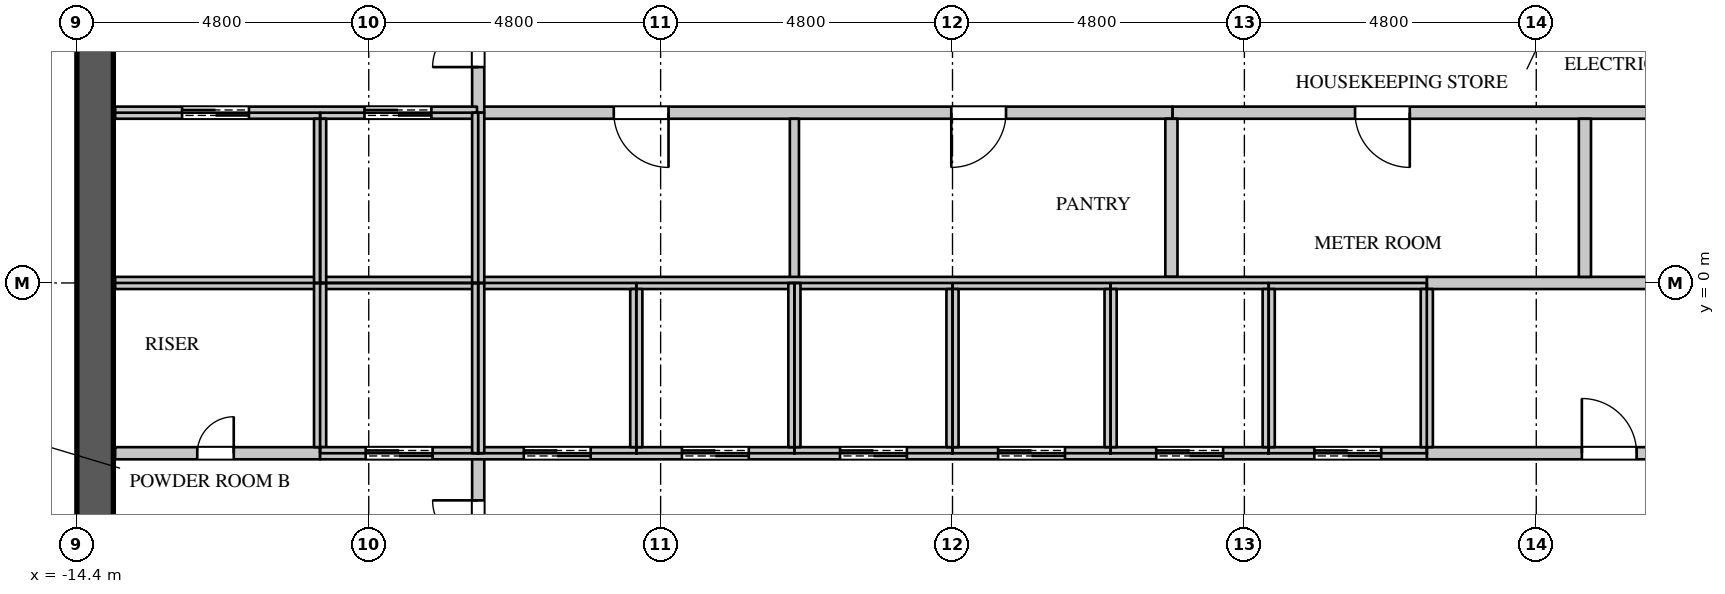
"""IFC4 building model, lengths in metres.
Left out: names, types, materials, properties, quantities, classifications, styles, units other than length and angle.
Written with IfcOpenShell. Run it as: python <this file> out.ifc"""

import sys

from ifc_helpers import new_model, si_unit, direction, frame, frame_2d, origin, place, context, subcontext, project, spatial, rectangle, extrude, element, fill, save


model = new_model("IFC4")
c1 = context("Model", 3, precision=1e-05, world=origin(), true_north=direction((0.0, 1.0)))
c2 = subcontext(c1, "Body", "Model", "MODEL_VIEW")
j1 = project(units=[si_unit("LENGTHUNIT", "METRE"), si_unit("PLANEANGLEUNIT", "RADIAN")], contexts=[c1])
p1 = place(None, origin())
s1 = spatial("IfcSite", under=j1, at=p1, CompositionType="ELEMENT")
p2 = place(p1, origin())
s2 = spatial("IfcBuilding", under=s1, at=p2, CompositionType="ELEMENT")
p3 = place(p2, frame((0.0, 0.0, 247.5)))
s3 = spatial("IfcBuildingStorey", under=s2, at=p3, CompositionType="ELEMENT", Elevation=247.5)
p4 = place(p3, frame((-14.1, -11.4, 0.0), z_axis=(0.0, 0.0, 1.0), x_axis=(0.0, 1.0, 0.0)))
e1 = element("IfcWall", 1, at=p4, inside=s3, PredefinedType="SHEAR", context=c2, shape_type="SweptSolid", body=[
    extrude(rectangle(XDim=22.8, YDim=0.6, at=frame_2d((11.4, 0.0))), origin(), (0.0, 0.0, 1.0), 4.2),
])
p5 = place(p4, frame((20.45, 0.0, 0.0)))
e2 = element("IfcOpeningElement", 2, at=p5, cuts=e1, PredefinedType="OPENING", context=c2, shape_type="SweptSolid", body=[
    extrude(rectangle(XDim=1.1, YDim=2.2, at=frame_2d((0.55, 1.1))), frame((0.0, 0.31, 0.0), z_axis=(0.0, -1.0, 0.0), x_axis=(1.0, 0.0, 0.0)), (0.0, 0.0, 1.0), 0.62),
])
p6 = place(p4, frame((1.25, 0.0, 0.0)))
e3 = element("IfcOpeningElement", 3, at=p6, cuts=e1, PredefinedType="OPENING", context=c2, shape_type="SweptSolid", body=[
    extrude(rectangle(XDim=1.1, YDim=2.2, at=frame_2d((0.55, 1.1))), frame((0.0, 0.31, 0.0), z_axis=(0.0, -1.0, 0.0), x_axis=(1.0, 0.0, 0.0)), (0.0, 0.0, 1.0), 0.62),
])
p7 = place(p4, frame((16.15, 0.0, 0.0)))
e4 = element("IfcOpeningElement", 4, at=p7, cuts=e1, PredefinedType="OPENING", context=c2, shape_type="SweptSolid", body=[
    extrude(rectangle(XDim=1.5, YDim=2.4, at=frame_2d((0.75, 1.2))), frame((0.0, 0.31, 0.0), z_axis=(0.0, -1.0, 0.0), x_axis=(1.0, 0.0, 0.0)), (0.0, 0.0, 1.0), 0.62),
])
p8 = place(p4, frame((5.15, 0.0, 0.0)))
e5 = element("IfcOpeningElement", 5, at=p8, cuts=e1, PredefinedType="OPENING", context=c2, shape_type="SweptSolid", body=[
    extrude(rectangle(XDim=1.5, YDim=2.4, at=frame_2d((0.75, 1.2))), frame((0.0, 0.31, 0.0), z_axis=(0.0, -1.0, 0.0), x_axis=(1.0, 0.0, 0.0)), (0.0, 0.0, 1.0), 0.62),
])
p9 = place(p3, frame((-7.82, 2.8, 0.0), z_axis=(0.0, 0.0, 1.0), x_axis=(1.0, 0.0, 0.0)))
e6 = element("IfcWall", 6, at=p9, inside=s3, PredefinedType="PARTITIONING", context=c2, shape_type="SweptSolid", body=[
    extrude(rectangle(XDim=11.44, YDim=0.2, at=frame_2d((5.72, 0.0))), origin(), (0.0, 0.0, 1.0), 3.95),
])
p10 = place(p9, frame((2.25, 0.0, 0.0)))
e7 = element("IfcOpeningElement", 7, at=p10, cuts=e6, PredefinedType="OPENING", context=c2, shape_type="SweptSolid", body=[
    extrude(rectangle(XDim=0.9, YDim=2.2, at=frame_2d((0.45, 1.1))), frame((0.0, 0.11, 0.0), z_axis=(0.0, -1.0, 0.0), x_axis=(1.0, 0.0, 0.0)), (0.0, 0.0, 1.0), 0.22),
])
p11 = place(p9, frame((7.8, 0.0, 0.0)))
e8 = element("IfcOpeningElement", 8, at=p11, cuts=e6, PredefinedType="OPENING", context=c2, shape_type="SweptSolid", body=[
    extrude(rectangle(XDim=0.9, YDim=2.2, at=frame_2d((0.45, 1.1))), frame((0.0, 0.11, 0.0), z_axis=(0.0, -1.0, 0.0), x_axis=(1.0, 0.0, 0.0)), (0.0, 0.0, 1.0), 0.22),
])
p12 = place(p3, frame((-7.8, -8.075, 0.0), z_axis=(0.0, 0.0, 1.0), x_axis=(0.0, 1.0, 0.0)))
e9 = element("IfcWall", 9, at=p12, inside=s3, PredefinedType="PARTITIONING", context=c2, shape_type="SweptSolid", body=[
    extrude(rectangle(XDim=5.275, YDim=0.2, at=frame_2d((2.637, 0.0))), origin(), (0.0, 0.0, 1.0), 3.95),
])
p13 = place(p12, frame((3.0, 0.0, 0.0)))
e10 = element("IfcOpeningElement", 10, at=p13, cuts=e9, PredefinedType="OPENING", context=c2, shape_type="SweptSolid", body=[
    extrude(rectangle(XDim=1.5, YDim=2.4, at=frame_2d((0.75, 1.2))), frame((0.0, 0.11, 0.0), z_axis=(0.0, -1.0, 0.0), x_axis=(1.0, 0.0, 0.0)), (0.0, 0.0, 1.0), 0.22),
])
p14 = place(p3, frame((-7.8, 2.8, 0.0), z_axis=(0.0, 0.0, 1.0), x_axis=(0.0, 1.0, 0.0)))
e11 = element("IfcWall", 11, at=p14, inside=s3, PredefinedType="PARTITIONING", context=c2, shape_type="SweptSolid", body=[
    extrude(rectangle(XDim=5.275, YDim=0.2, at=frame_2d((2.637, 0.0))), origin(), (0.0, 0.0, 1.0), 3.95),
])
p15 = place(p14, frame((0.75, 0.0, 0.0)))
e12 = element("IfcOpeningElement", 12, at=p15, cuts=e11, PredefinedType="OPENING", context=c2, shape_type="SweptSolid", body=[
    extrude(rectangle(XDim=1.5, YDim=2.4, at=frame_2d((0.75, 1.2))), frame((0.0, 0.11, 0.0), z_axis=(0.0, -1.0, 0.0), x_axis=(1.0, 0.0, 0.0)), (0.0, 0.0, 1.0), 0.22),
])
p16 = place(p3, frame((-2.6, 0.0, 0.0), z_axis=(0.0, 0.0, 1.0), x_axis=(0.0, 1.0, 0.0)))
e13 = element("IfcWall", 13, at=p16, inside=s3, PredefinedType="PARTITIONING", context=c2, shape_type="SweptSolid", body=[
    extrude(rectangle(XDim=2.7, YDim=0.15, at=frame_2d((1.35, 0.0))), origin(), (0.0, 0.0, 1.0), 3.95),
])
p17 = place(p3, frame((-13.77, -2.8, 0.0), z_axis=(0.0, 0.0, 1.0), x_axis=(1.0, 0.0, 0.0)))
e14 = element("IfcWall", 14, at=p17, inside=s3, PredefinedType="PARTITIONING", context=c2, shape_type="SweptSolid", body=[
    extrude(rectangle(XDim=3.37, YDim=0.2, at=frame_2d((1.685, 0.0))), origin(), (0.0, 0.0, 1.0), 3.95),
])
p18 = place(p17, frame((1.35, 0.0, 0.0)))
e15 = element("IfcOpeningElement", 15, at=p18, cuts=e14, PredefinedType="OPENING", context=c2, shape_type="SweptSolid", body=[
    extrude(rectangle(XDim=0.6, YDim=2.0, at=frame_2d((0.3, 1.0))), frame((0.0, 0.11, 0.0), z_axis=(0.0, -1.0, 0.0), x_axis=(1.0, 0.0, 0.0)), (0.0, 0.0, 1.0), 0.22),
])
p19 = place(p3, frame((3.62, 2.8, 0.0), z_axis=(0.0, 0.0, 1.0), x_axis=(1.0, 0.0, 0.0)))
e16 = element("IfcWall", 16, at=p19, inside=s3, PredefinedType="PARTITIONING", context=c2, shape_type="SweptSolid", body=[
    extrude(rectangle(XDim=10.15, YDim=0.2, at=frame_2d((5.075, 0.0))), origin(), (0.0, 0.0, 1.0), 3.95),
])
p20 = place(p19, frame((8.1, 0.0, 0.0)))
e17 = element("IfcOpeningElement", 17, at=p20, cuts=e16, PredefinedType="OPENING", context=c2, shape_type="SweptSolid", body=[
    extrude(rectangle(XDim=0.6, YDim=2.0, at=frame_2d((0.3, 1.0))), frame((0.0, 0.11, 0.0), z_axis=(0.0, -1.0, 0.0), x_axis=(1.0, 0.0, 0.0)), (0.0, 0.0, 1.0), 0.22),
])
p21 = place(p19, frame((3.0, 0.0, 0.0)))
e18 = element("IfcOpeningElement", 18, at=p21, cuts=e16, PredefinedType="OPENING", context=c2, shape_type="SweptSolid", body=[
    extrude(rectangle(XDim=0.9, YDim=2.2, at=frame_2d((0.45, 1.1))), frame((0.0, 0.11, 0.0), z_axis=(0.0, -1.0, 0.0), x_axis=(1.0, 0.0, 0.0)), (0.0, 0.0, 1.0), 0.22),
])
p22 = place(p3, frame((3.6, 0.1, 0.0), z_axis=(0.0, 0.0, 1.0), x_axis=(0.0, 1.0, 0.0)))
e19 = element("IfcWall", 19, at=p22, inside=s3, PredefinedType="PARTITIONING", context=c2, shape_type="SweptSolid", body=[
    extrude(rectangle(XDim=2.6, YDim=0.2, at=frame_2d((1.3, 0.0))), origin(), (0.0, 0.0, 1.0), 3.95),
])
p23 = place(p3, frame((7.8, -2.8, 0.0), z_axis=(0.0, 0.0, 1.0), x_axis=(1.0, 0.0, 0.0)))
e20 = element("IfcWall", 20, at=p23, inside=s3, PredefinedType="PARTITIONING", context=c2, shape_type="SweptSolid", body=[
    extrude(rectangle(XDim=5.97, YDim=0.2, at=frame_2d((2.985, 0.0))), origin(), (0.0, 0.0, 1.0), 3.95),
])
p24 = place(p23, frame((2.55, 0.0, 0.0)))
e21 = element("IfcOpeningElement", 21, at=p24, cuts=e20, PredefinedType="OPENING", context=c2, shape_type="SweptSolid", body=[
    extrude(rectangle(XDim=0.9, YDim=2.2, at=frame_2d((0.45, 1.1))), frame((0.0, 0.11, 0.0), z_axis=(0.0, -1.0, 0.0), x_axis=(1.0, 0.0, 0.0)), (0.0, 0.0, 1.0), 0.22),
])
p25 = place(p3, frame((7.8, 0.0, 0.0), z_axis=(0.0, 0.0, 1.0), x_axis=(1.0, 0.0, 0.0)))
e22 = element("IfcWall", 22, at=p25, inside=s3, PredefinedType="PARTITIONING", context=c2, shape_type="SweptSolid", body=[
    extrude(rectangle(XDim=5.97, YDim=0.2, at=frame_2d((2.985, 0.0))), origin(), (0.0, 0.0, 1.0), 3.95),
])
p26 = place(p3, frame((10.4, 0.1, 0.0), z_axis=(0.0, 0.0, 1.0), x_axis=(0.0, 1.0, 0.0)))
e23 = element("IfcWall", 23, at=p26, inside=s3, PredefinedType="PARTITIONING", context=c2, shape_type="SweptSolid", body=[
    extrude(rectangle(XDim=2.6, YDim=0.2, at=frame_2d((1.3, 0.0))), origin(), (0.0, 0.0, 1.0), 3.95),
])
p27 = place(p3, frame((-13.77, 0.0, 0.0), z_axis=(0.0, 0.0, 1.0), x_axis=(1.0, 0.0, 0.0)))
e24 = element("IfcWall", 24, at=p27, inside=s3, PredefinedType="PARTITIONING", context=c2, shape_type="SweptSolid", body=[
    extrude(rectangle(XDim=21.57, YDim=0.2, at=frame_2d((10.785, 0.0))), origin(), (0.0, 0.0, 1.0), 3.95),
])
p28 = place(p3, frame((-13.77, 2.8, 0.0), z_axis=(0.0, 0.0, 1.0), x_axis=(1.0, 0.0, 0.0)))
e25 = element("IfcWall", 25, at=p28, inside=s3, PredefinedType="PARTITIONING", context=c2, shape_type="SweptSolid", body=[
    extrude(rectangle(XDim=5.95, YDim=0.2, at=frame_2d((2.975, 0.0))), origin(), (0.0, 0.0, 1.0), 3.95),
])
p29 = place(p28, frame((1.1, 0.0, 0.0)))
e26 = element("IfcOpeningElement", 26, at=p29, cuts=e25, PredefinedType="OPENING", context=c2, shape_type="SweptSolid", body=[
    extrude(rectangle(XDim=1.1, YDim=2.2, at=frame_2d((0.55, 1.1))), frame((0.0, 0.11, 0.0), z_axis=(0.0, -1.0, 0.0), x_axis=(1.0, 0.0, 0.0)), (0.0, 0.0, 1.0), 0.22),
])
p30 = place(p28, frame((4.1, 0.0, 0.0)))
e27 = element("IfcOpeningElement", 27, at=p30, cuts=e25, PredefinedType="OPENING", context=c2, shape_type="SweptSolid", body=[
    extrude(rectangle(XDim=1.1, YDim=2.2, at=frame_2d((0.55, 1.1))), frame((0.0, 0.11, 0.0), z_axis=(0.0, -1.0, 0.0), x_axis=(1.0, 0.0, 0.0)), (0.0, 0.0, 1.0), 0.22),
])
p31 = place(p3, frame((-10.4, -2.7, 0.0), z_axis=(0.0, 0.0, 1.0), x_axis=(0.0, 1.0, 0.0)))
e28 = element("IfcWall", 28, at=p31, inside=s3, PredefinedType="PARTITIONING", context=c2, shape_type="SweptSolid", body=[
    extrude(rectangle(XDim=2.7, YDim=0.2, at=frame_2d((1.35, 0.0))), origin(), (0.0, 0.0, 1.0), 3.95),
])
p32 = place(p3, frame((-10.4, -2.8, 0.0), z_axis=(0.0, 0.0, 1.0), x_axis=(1.0, 0.0, 0.0)))
e29 = element("IfcWall", 29, at=p32, inside=s3, PredefinedType="PARTITIONING", context=c2, shape_type="SweptSolid", body=[
    extrude(rectangle(XDim=18.2, YDim=0.2, at=frame_2d((9.1, 0.0))), origin(), (0.0, 0.0, 1.0), 3.95),
])
p33 = place(p32, frame((0.75, 0.0, 0.0)))
e30 = element("IfcOpeningElement", 30, at=p33, cuts=e29, PredefinedType="OPENING", context=c2, shape_type="SweptSolid", body=[
    extrude(rectangle(XDim=1.1, YDim=2.2, at=frame_2d((0.55, 1.1))), frame((0.0, 0.11, 0.0), z_axis=(0.0, -1.0, 0.0), x_axis=(1.0, 0.0, 0.0)), (0.0, 0.0, 1.0), 0.22),
])
p34 = place(p32, frame((3.35, 0.0, 0.0)))
e31 = element("IfcOpeningElement", 31, at=p34, cuts=e29, PredefinedType="OPENING", context=c2, shape_type="SweptSolid", body=[
    extrude(rectangle(XDim=1.1, YDim=2.2, at=frame_2d((0.55, 1.1))), frame((0.0, 0.11, 0.0), z_axis=(0.0, -1.0, 0.0), x_axis=(1.0, 0.0, 0.0)), (0.0, 0.0, 1.0), 0.22),
])
p35 = place(p32, frame((5.95, 0.0, 0.0)))
e32 = element("IfcOpeningElement", 32, at=p35, cuts=e29, PredefinedType="OPENING", context=c2, shape_type="SweptSolid", body=[
    extrude(rectangle(XDim=1.1, YDim=2.2, at=frame_2d((0.55, 1.1))), frame((0.0, 0.11, 0.0), z_axis=(0.0, -1.0, 0.0), x_axis=(1.0, 0.0, 0.0)), (0.0, 0.0, 1.0), 0.22),
])
p36 = place(p32, frame((8.55, 0.0, 0.0)))
e33 = element("IfcOpeningElement", 33, at=p36, cuts=e29, PredefinedType="OPENING", context=c2, shape_type="SweptSolid", body=[
    extrude(rectangle(XDim=1.1, YDim=2.2, at=frame_2d((0.55, 1.1))), frame((0.0, 0.11, 0.0), z_axis=(0.0, -1.0, 0.0), x_axis=(1.0, 0.0, 0.0)), (0.0, 0.0, 1.0), 0.22),
])
p37 = place(p32, frame((11.15, 0.0, 0.0)))
e34 = element("IfcOpeningElement", 34, at=p37, cuts=e29, PredefinedType="OPENING", context=c2, shape_type="SweptSolid", body=[
    extrude(rectangle(XDim=1.1, YDim=2.2, at=frame_2d((0.55, 1.1))), frame((0.0, 0.11, 0.0), z_axis=(0.0, -1.0, 0.0), x_axis=(1.0, 0.0, 0.0)), (0.0, 0.0, 1.0), 0.22),
])
p38 = place(p32, frame((13.75, 0.0, 0.0)))
e35 = element("IfcOpeningElement", 35, at=p38, cuts=e29, PredefinedType="OPENING", context=c2, shape_type="SweptSolid", body=[
    extrude(rectangle(XDim=1.1, YDim=2.2, at=frame_2d((0.55, 1.1))), frame((0.0, 0.11, 0.0), z_axis=(0.0, -1.0, 0.0), x_axis=(1.0, 0.0, 0.0)), (0.0, 0.0, 1.0), 0.22),
])
p39 = place(p32, frame((16.35, 0.0, 0.0)))
e36 = element("IfcOpeningElement", 36, at=p39, cuts=e29, PredefinedType="OPENING", context=c2, shape_type="SweptSolid", body=[
    extrude(rectangle(XDim=1.1, YDim=2.2, at=frame_2d((0.55, 1.1))), frame((0.0, 0.11, 0.0), z_axis=(0.0, -1.0, 0.0), x_axis=(1.0, 0.0, 0.0)), (0.0, 0.0, 1.0), 0.22),
])
p40 = place(p3, frame((-10.4, 0.0, 0.0), z_axis=(0.0, 0.0, 1.0), x_axis=(0.0, 1.0, 0.0)))
e37 = element("IfcWall", 37, at=p40, inside=s3, PredefinedType="PARTITIONING", context=c2, shape_type="SweptSolid", body=[
    extrude(rectangle(XDim=2.7, YDim=0.2, at=frame_2d((1.35, 0.0))), origin(), (0.0, 0.0, 1.0), 3.95),
])
for number, where, z_axis, x_axis in (
    (38, (-7.8, -2.8, 0.0), (0.0, 0.0, 1.0), (0.0, 1.0, 0.0)),
    (39, (-7.8, 0.0, 0.0), (0.0, 0.0, 1.0), (0.0, 1.0, 0.0)),
):
    element("IfcWall", number, at=place(p3, frame(where, z_axis=z_axis, x_axis=x_axis)), inside=s3, PredefinedType="PARTITIONING", context=c2, shape_type="SweptSolid", body=[
        extrude(rectangle(XDim=2.8, YDim=0.2, at=frame_2d((1.4, 0.0))), origin(), (0.0, 0.0, 1.0), 3.95),
    ])
p41 = place(p3, frame((-5.2, -2.7, 0.0), z_axis=(0.0, 0.0, 1.0), x_axis=(0.0, 1.0, 0.0)))
e40 = element("IfcWall", 40, at=p41, inside=s3, PredefinedType="PARTITIONING", context=c2, shape_type="SweptSolid", body=[
    extrude(rectangle(XDim=2.6, YDim=0.2, at=frame_2d((1.3, 0.0))), origin(), (0.0, 0.0, 1.0), 3.95),
])
p42 = place(p3, frame((-2.6, -2.7, 0.0), z_axis=(0.0, 0.0, 1.0), x_axis=(0.0, 1.0, 0.0)))
e41 = element("IfcWall", 41, at=p42, inside=s3, PredefinedType="PARTITIONING", context=c2, shape_type="SweptSolid", body=[
    extrude(rectangle(XDim=2.7, YDim=0.2, at=frame_2d((1.35, 0.0))), origin(), (0.0, 0.0, 1.0), 3.95),
])
for number, where, z_axis, x_axis in (
    (42, (0.0, -2.7, 0.0), (0.0, 0.0, 1.0), (0.0, 1.0, 0.0)),
    (43, (2.6, -2.7, 0.0), (0.0, 0.0, 1.0), (0.0, 1.0, 0.0)),
    (44, (5.2, -2.7, 0.0), (0.0, 0.0, 1.0), (0.0, 1.0, 0.0)),
    (45, (7.8, -2.7, 0.0), (0.0, 0.0, 1.0), (0.0, 1.0, 0.0)),
):
    element("IfcWall", number, at=place(p3, frame(where, z_axis=z_axis, x_axis=x_axis)), inside=s3, PredefinedType="PARTITIONING", context=c2, shape_type="SweptSolid", body=[
        extrude(rectangle(XDim=2.6, YDim=0.2, at=frame_2d((1.3, 0.0))), origin(), (0.0, 0.0, 1.0), 3.95),
    ])
p43 = place(p18, origin())
e46 = element("IfcDoor", 46, at=p43, inside=s3, OperationType="SINGLE_SWING_RIGHT", PredefinedType="DOOR", context=c2, shape_type="SweptSolid", body=[
    extrude(rectangle(XDim=0.6, YDim=2.0, at=frame_2d((0.3, 1.0))), frame((0.0, 0.025, 0.0), z_axis=(0.0, -1.0, 0.0), x_axis=(1.0, 0.0, 0.0)), (0.0, 0.0, 1.0), 0.05),
])
fill(e15, e46)
p44 = place(p24, origin())
e47 = element("IfcDoor", 47, at=p44, inside=s3, OperationType="SINGLE_SWING_LEFT", PredefinedType="DOOR", context=c2, shape_type="SweptSolid", body=[
    extrude(rectangle(XDim=0.9, YDim=2.2, at=frame_2d((0.45, 1.1))), frame((0.0, 0.025, 0.0), z_axis=(0.0, -1.0, 0.0), x_axis=(1.0, 0.0, 0.0)), (0.0, 0.0, 1.0), 0.05),
])
fill(e21, e47)
p45 = place(p10, origin())
e48 = element("IfcDoor", 48, at=p45, inside=s3, OperationType="SINGLE_SWING_LEFT", PredefinedType="DOOR", context=c2, shape_type="SweptSolid", body=[
    extrude(rectangle(XDim=0.9, YDim=2.2, at=frame_2d((0.45, 1.1))), frame((0.0, 0.025, 0.0), z_axis=(0.0, -1.0, 0.0), x_axis=(1.0, 0.0, 0.0)), (0.0, 0.0, 1.0), 0.05),
])
fill(e7, e48)
p46 = place(p11, origin())
e49 = element("IfcDoor", 49, at=p46, inside=s3, OperationType="SINGLE_SWING_RIGHT", PredefinedType="DOOR", context=c2, shape_type="SweptSolid", body=[
    extrude(rectangle(XDim=0.9, YDim=2.2, at=frame_2d((0.45, 1.1))), frame((0.0, 0.025, 0.0), z_axis=(0.0, -1.0, 0.0), x_axis=(1.0, 0.0, 0.0)), (0.0, 0.0, 1.0), 0.05),
])
fill(e8, e49)
p47 = place(p21, origin())
e50 = element("IfcDoor", 50, at=p47, inside=s3, OperationType="SINGLE_SWING_LEFT", PredefinedType="DOOR", context=c2, shape_type="SweptSolid", body=[
    extrude(rectangle(XDim=0.9, YDim=2.2, at=frame_2d((0.45, 1.1))), frame((0.0, 0.025, 0.0), z_axis=(0.0, -1.0, 0.0), x_axis=(1.0, 0.0, 0.0)), (0.0, 0.0, 1.0), 0.05),
])
fill(e18, e50)
p48 = place(p29, origin())
e51 = element("IfcDoor", 51, at=p48, inside=s3, OperationType="DOUBLE_DOOR_SLIDING", PredefinedType="DOOR", context=c2, shape_type="SweptSolid", body=[
    extrude(rectangle(XDim=1.1, YDim=2.2, at=frame_2d((0.55, 1.1))), frame((0.0, 0.025, 0.0), z_axis=(0.0, -1.0, 0.0), x_axis=(1.0, 0.0, 0.0)), (0.0, 0.0, 1.0), 0.05),
])
fill(e26, e51)
p49 = place(p30, origin())
e52 = element("IfcDoor", 52, at=p49, inside=s3, OperationType="DOUBLE_DOOR_SLIDING", PredefinedType="DOOR", context=c2, shape_type="SweptSolid", body=[
    extrude(rectangle(XDim=1.1, YDim=2.2, at=frame_2d((0.55, 1.1))), frame((0.0, 0.025, 0.0), z_axis=(0.0, -1.0, 0.0), x_axis=(1.0, 0.0, 0.0)), (0.0, 0.0, 1.0), 0.05),
])
fill(e27, e52)
p50 = place(p33, origin())
e53 = element("IfcDoor", 53, at=p50, inside=s3, OperationType="DOUBLE_DOOR_SLIDING", PredefinedType="DOOR", context=c2, shape_type="SweptSolid", body=[
    extrude(rectangle(XDim=1.1, YDim=2.2, at=frame_2d((0.55, 1.1))), frame((0.0, 0.025, 0.0), z_axis=(0.0, -1.0, 0.0), x_axis=(1.0, 0.0, 0.0)), (0.0, 0.0, 1.0), 0.05),
])
fill(e30, e53)
p51 = place(p34, origin())
e54 = element("IfcDoor", 54, at=p51, inside=s3, OperationType="DOUBLE_DOOR_SLIDING", PredefinedType="DOOR", context=c2, shape_type="SweptSolid", body=[
    extrude(rectangle(XDim=1.1, YDim=2.2, at=frame_2d((0.55, 1.1))), frame((0.0, 0.025, 0.0), z_axis=(0.0, -1.0, 0.0), x_axis=(1.0, 0.0, 0.0)), (0.0, 0.0, 1.0), 0.05),
])
fill(e31, e54)
p52 = place(p35, origin())
e55 = element("IfcDoor", 55, at=p52, inside=s3, OperationType="DOUBLE_DOOR_SLIDING", PredefinedType="DOOR", context=c2, shape_type="SweptSolid", body=[
    extrude(rectangle(XDim=1.1, YDim=2.2, at=frame_2d((0.55, 1.1))), frame((0.0, 0.025, 0.0), z_axis=(0.0, -1.0, 0.0), x_axis=(1.0, 0.0, 0.0)), (0.0, 0.0, 1.0), 0.05),
])
fill(e32, e55)
p53 = place(p36, origin())
e56 = element("IfcDoor", 56, at=p53, inside=s3, OperationType="DOUBLE_DOOR_SLIDING", PredefinedType="DOOR", context=c2, shape_type="SweptSolid", body=[
    extrude(rectangle(XDim=1.1, YDim=2.2, at=frame_2d((0.55, 1.1))), frame((0.0, 0.025, 0.0), z_axis=(0.0, -1.0, 0.0), x_axis=(1.0, 0.0, 0.0)), (0.0, 0.0, 1.0), 0.05),
])
fill(e33, e56)
p54 = place(p37, origin())
e57 = element("IfcDoor", 57, at=p54, inside=s3, OperationType="DOUBLE_DOOR_SLIDING", PredefinedType="DOOR", context=c2, shape_type="SweptSolid", body=[
    extrude(rectangle(XDim=1.1, YDim=2.2, at=frame_2d((0.55, 1.1))), frame((0.0, 0.025, 0.0), z_axis=(0.0, -1.0, 0.0), x_axis=(1.0, 0.0, 0.0)), (0.0, 0.0, 1.0), 0.05),
])
fill(e34, e57)
p55 = place(p38, origin())
e58 = element("IfcDoor", 58, at=p55, inside=s3, OperationType="DOUBLE_DOOR_SLIDING", PredefinedType="DOOR", context=c2, shape_type="SweptSolid", body=[
    extrude(rectangle(XDim=1.1, YDim=2.2, at=frame_2d((0.55, 1.1))), frame((0.0, 0.025, 0.0), z_axis=(0.0, -1.0, 0.0), x_axis=(1.0, 0.0, 0.0)), (0.0, 0.0, 1.0), 0.05),
])
fill(e35, e58)
p56 = place(p39, origin())
e59 = element("IfcDoor", 59, at=p56, inside=s3, OperationType="DOUBLE_DOOR_SLIDING", PredefinedType="DOOR", context=c2, shape_type="SweptSolid", body=[
    extrude(rectangle(XDim=1.1, YDim=2.2, at=frame_2d((0.55, 1.1))), frame((0.0, 0.025, 0.0), z_axis=(0.0, -1.0, 0.0), x_axis=(1.0, 0.0, 0.0)), (0.0, 0.0, 1.0), 0.05),
])
fill(e36, e59)
p57 = place(p15, origin())
e60 = element("IfcDoor", 60, at=p57, inside=s3, OperationType="DOUBLE_DOOR_SINGLE_SWING", PredefinedType="DOOR", context=c2, shape_type="SweptSolid", body=[
    extrude(rectangle(XDim=1.5, YDim=2.4, at=frame_2d((0.75, 1.2))), frame((0.0, 0.025, 0.0), z_axis=(0.0, -1.0, 0.0), x_axis=(1.0, 0.0, 0.0)), (0.0, 0.0, 1.0), 0.05),
])
fill(e12, e60)
p58 = place(p13, origin())
e61 = element("IfcDoor", 61, at=p58, inside=s3, OperationType="DOUBLE_DOOR_SINGLE_SWING", PredefinedType="DOOR", context=c2, shape_type="SweptSolid", body=[
    extrude(rectangle(XDim=1.5, YDim=2.4, at=frame_2d((0.75, 1.2))), frame((0.0, 0.025, 0.0), z_axis=(0.0, -1.0, 0.0), x_axis=(1.0, 0.0, 0.0)), (0.0, 0.0, 1.0), 0.05),
])
fill(e10, e61)
save(model, sys.argv[1])
